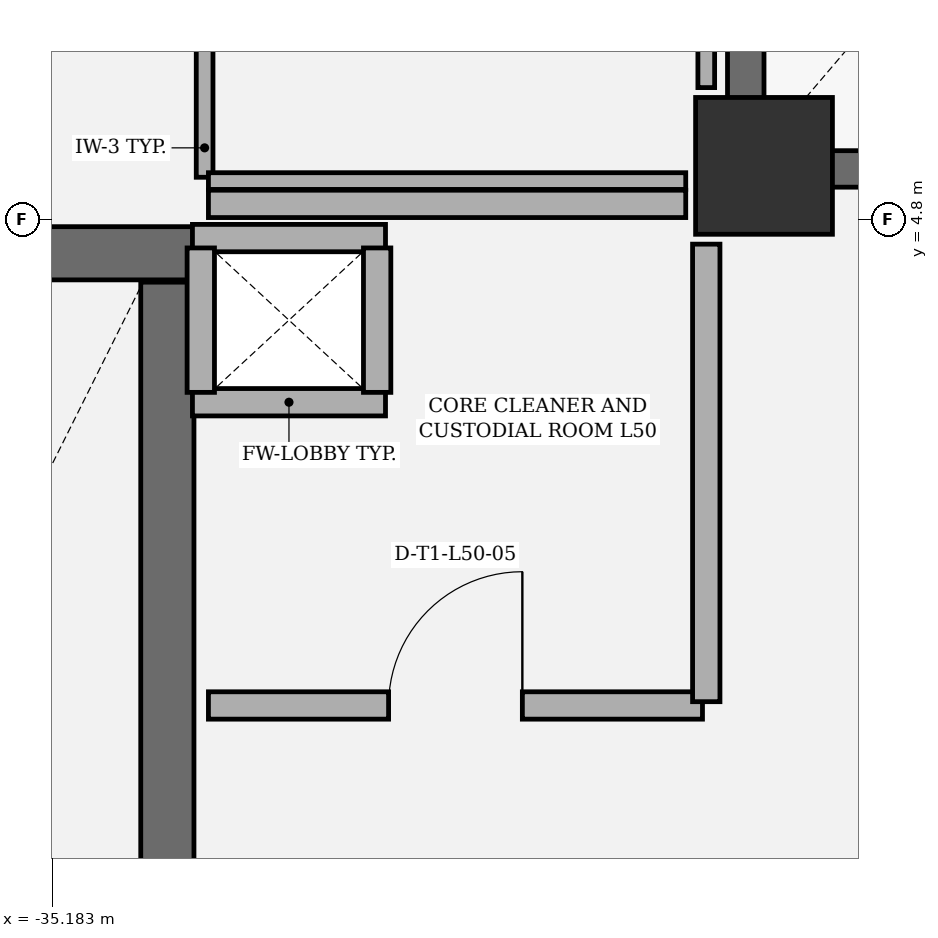
"""IFC4 building model, lengths in metres.
Left out: names, types, materials, properties, quantities, classifications, styles, units other than length and angle.
Written with IfcOpenShell. Run it as: python <this file> out.ifc"""

import sys

from ifc_helpers import new_model, si_unit, direction, frame, frame_2d, origin, origin_2d, place, context, subcontext, project, spatial, rectangle, extrude, element, fill, save


model = new_model("IFC4")
c1 = context("Model", 3, precision=1e-05, world=origin(), true_north=direction((0.0, 1.0)))
c2 = subcontext(c1, "Body", "Model", "MODEL_VIEW")
j1 = project(units=[si_unit("LENGTHUNIT", "METRE"), si_unit("PLANEANGLEUNIT", "RADIAN")], contexts=[c1])
p1 = place(None, origin())
s1 = spatial("IfcSite", under=j1, at=p1, CompositionType="ELEMENT")
p2 = place(p1, origin())
s2 = spatial("IfcBuilding", under=s1, at=p2, CompositionType="ELEMENT")
p3 = place(p2, frame((0.0, 0.0, 217.2)))
s3 = spatial("IfcBuildingStorey", under=s2, at=p3, CompositionType="ELEMENT", Elevation=217.2)
p4 = place(p3, frame((-30.5, 5.15, 0.0), z_axis=(0.0, 0.0, 1.0), x_axis=(1.0, 0.0, 0.0)))
e1 = element("IfcColumn", 1, at=p4, inside=s3, PredefinedType="COLUMN", context=c2, shape_type="SweptSolid", body=[
    extrude(rectangle(XDim=0.9, YDim=0.9, at=origin_2d()), origin(), (0.0, 0.0, 1.0), 4.05),
])
p5 = place(p3, frame((-34.25, 4.575, 0.0), z_axis=(0.0, 0.0, 1.0), x_axis=(-1.0, 0.0, 0.0)))
e2 = element("IfcWall", 2, at=p5, inside=s3, PredefinedType="SHEAR", context=c2, shape_type="SweptSolid", body=[
    extrude(rectangle(XDim=4.21, YDim=0.35, at=frame_2d((2.105, 0.0))), origin(), (0.0, 0.0, 1.0), 3.78),
])
p6 = place(p3, frame((-34.425, -4.385, 0.0), z_axis=(0.0, 0.0, 1.0), x_axis=(0.0, 1.0, 0.0)))
e3 = element("IfcWall", 3, at=p6, inside=s3, PredefinedType="SHEAR", context=c2, shape_type="SweptSolid", body=[
    extrude(rectangle(XDim=8.77, YDim=0.35, at=frame_2d((4.385, 0.0))), origin(), (0.0, 0.0, 1.0), 3.78),
])
p7 = place(p3, frame((-28.26, 5.13, 0.0), z_axis=(0.0, 0.0, 1.0), x_axis=(-1.0, 0.0, 0.0)))
e4 = element("IfcWall", 4, at=p7, inside=s3, PredefinedType="SHEAR", context=c2, shape_type="SweptSolid", body=[
    extrude(rectangle(XDim=2.48, YDim=0.24, at=frame_2d((1.24, 0.0))), origin(), (0.0, 0.0, 1.0), 3.78),
])
p8 = place(p3, frame((-30.62, 5.262, 0.0), z_axis=(0.0, 0.0, 1.0), x_axis=(0.0, 1.0, 0.0)))
e5 = element("IfcWall", 5, at=p8, inside=s3, PredefinedType="SHEAR", context=c2, shape_type="SweptSolid", body=[
    extrude(rectangle(XDim=2.376, YDim=0.24, at=frame_2d((1.188, 0.0))), origin(), (0.0, 0.0, 1.0), 3.78),
])
for number, where, z_axis, x_axis in (
    (6, (-32.99, 3.595, 0.0), (0.0, 0.0, 1.0), (-1.0, 0.0, 0.0)),
    (7, (-34.26, 4.675, 0.0), (0.0, 0.0, 1.0), (1.0, 0.0, 0.0)),
):
    element("IfcWall", number, at=place(p3, frame(where, z_axis=z_axis, x_axis=x_axis)), inside=s3, PredefinedType="PARTITIONING", context=c2, shape_type="SweptSolid", body=[
        extrude(rectangle(XDim=1.27, YDim=0.18, at=frame_2d((0.635, 0.0))), origin(), (0.0, 0.0, 1.0), 3.78),
    ])
for number, where, z_axis, x_axis in (
    (8, (-34.205, 3.66, 0.0), (0.0, 0.0, 1.0), (0.0, 1.0, 0.0)),
    (9, (-33.045, 4.61, 0.0), (0.0, 0.0, 1.0), (0.0, -1.0, 0.0)),
):
    element("IfcWall", number, at=place(p3, frame(where, z_axis=z_axis, x_axis=x_axis)), inside=s3, PredefinedType="PARTITIONING", context=c2, shape_type="SweptSolid", body=[
        extrude(rectangle(XDim=0.95, YDim=0.18, at=frame_2d((0.475, 0.0))), origin(), (0.0, 0.0, 1.0), 3.78),
    ])
p9 = place(p3, frame((-34.18, 8.225, 0.0), z_axis=(0.0, 0.0, 1.0), x_axis=(0.0, -1.0, 0.0)))
e10 = element("IfcWall", 10, at=p9, inside=s3, PredefinedType="PARTITIONING", context=c2, shape_type="SweptSolid", body=[
    extrude(rectangle(XDim=3.15, YDim=0.11, at=frame_2d((1.575, 0.0))), origin(), (0.0, 0.0, 1.0), 3.78),
])
p10 = place(p9, frame((1.135, 0.0, 0.0)))
e11 = element("IfcOpeningElement", 11, at=p10, cuts=e10, PredefinedType="OPENING", context=c2, shape_type="SweptSolid", body=[
    extrude(rectangle(XDim=0.88, YDim=2.1, at=frame_2d((0.44, 1.05))), frame((0.0, 0.065, 0.0), z_axis=(0.0, -1.0, 0.0), x_axis=(1.0, 0.0, 0.0)), (0.0, 0.0, 1.0), 0.13),
])
p11 = place(p3, frame((-34.155, 5.05, 0.0), z_axis=(0.0, 0.0, 1.0), x_axis=(1.0, 0.0, 0.0)))
e12 = element("IfcWall", 12, at=p11, inside=s3, PredefinedType="PARTITIONING", context=c2, shape_type="SweptSolid", body=[
    extrude(rectangle(XDim=3.14, YDim=0.11, at=frame_2d((1.57, 0.0))), origin(), (0.0, 0.0, 1.0), 3.78),
])
p12 = place(p3, frame((-30.88, 5.665, 0.0), z_axis=(0.0, 0.0, 1.0), x_axis=(0.0, 1.0, 0.0)))
e13 = element("IfcWall", 13, at=p12, inside=s3, PredefinedType="PARTITIONING", context=c2, shape_type="SweptSolid", body=[
    extrude(rectangle(XDim=2.078, YDim=0.11, at=frame_2d((1.039, 0.0))), origin(), (0.0, 0.0, 1.0), 3.78),
])
p13 = place(p3, frame((-34.155, 1.6, 0.0), z_axis=(0.0, 0.0, 1.0), x_axis=(1.0, 0.0, 0.0)))
e14 = element("IfcWall", 14, at=p13, inside=s3, PredefinedType="PARTITIONING", context=c2, shape_type="SweptSolid", body=[
    extrude(rectangle(XDim=3.25, YDim=0.18, at=frame_2d((1.625, 0.0))), origin(), (0.0, 0.0, 1.0), 3.78),
])
p14 = place(p13, frame((1.185, 0.0, 0.0)))
e15 = element("IfcOpeningElement", 15, at=p14, cuts=e14, PredefinedType="OPENING", context=c2, shape_type="SweptSolid", body=[
    extrude(rectangle(XDim=0.88, YDim=2.1, at=frame_2d((0.44, 1.05))), frame((0.0, 0.1, 0.0), z_axis=(0.0, -1.0, 0.0), x_axis=(1.0, 0.0, 0.0)), (0.0, 0.0, 1.0), 0.2),
])
p15 = place(p3, frame((-30.88, 1.625, 0.0), z_axis=(0.0, 0.0, 1.0), x_axis=(0.0, 1.0, 0.0)))
e16 = element("IfcWall", 16, at=p15, inside=s3, PredefinedType="PARTITIONING", context=c2, shape_type="SweptSolid", body=[
    extrude(rectangle(XDim=3.01, YDim=0.18, at=frame_2d((1.505, 0.0))), origin(), (0.0, 0.0, 1.0), 3.78),
])
p16 = place(p3, frame((-31.015, 4.9, 0.0), z_axis=(0.0, 0.0, 1.0), x_axis=(-1.0, 0.0, 0.0)))
e17 = element("IfcWall", 17, at=p16, inside=s3, PredefinedType="PARTITIONING", context=c2, shape_type="SweptSolid", body=[
    extrude(rectangle(XDim=3.14, YDim=0.18, at=frame_2d((1.57, 0.0))), origin(), (0.0, 0.0, 1.0), 3.78),
])
p17 = place(p14, origin())
e18 = element("IfcDoor", 18, at=p17, inside=s3, OperationType="SINGLE_SWING_RIGHT", PredefinedType="DOOR", context=c2, shape_type="SweptSolid", body=[
    extrude(rectangle(XDim=0.88, YDim=2.1, at=frame_2d((0.44, 1.05))), frame((0.0, 0.025, 0.0), z_axis=(0.0, -1.0, 0.0), x_axis=(1.0, 0.0, 0.0)), (0.0, 0.0, 1.0), 0.05),
])
fill(e15, e18)
save(model, sys.argv[1])
